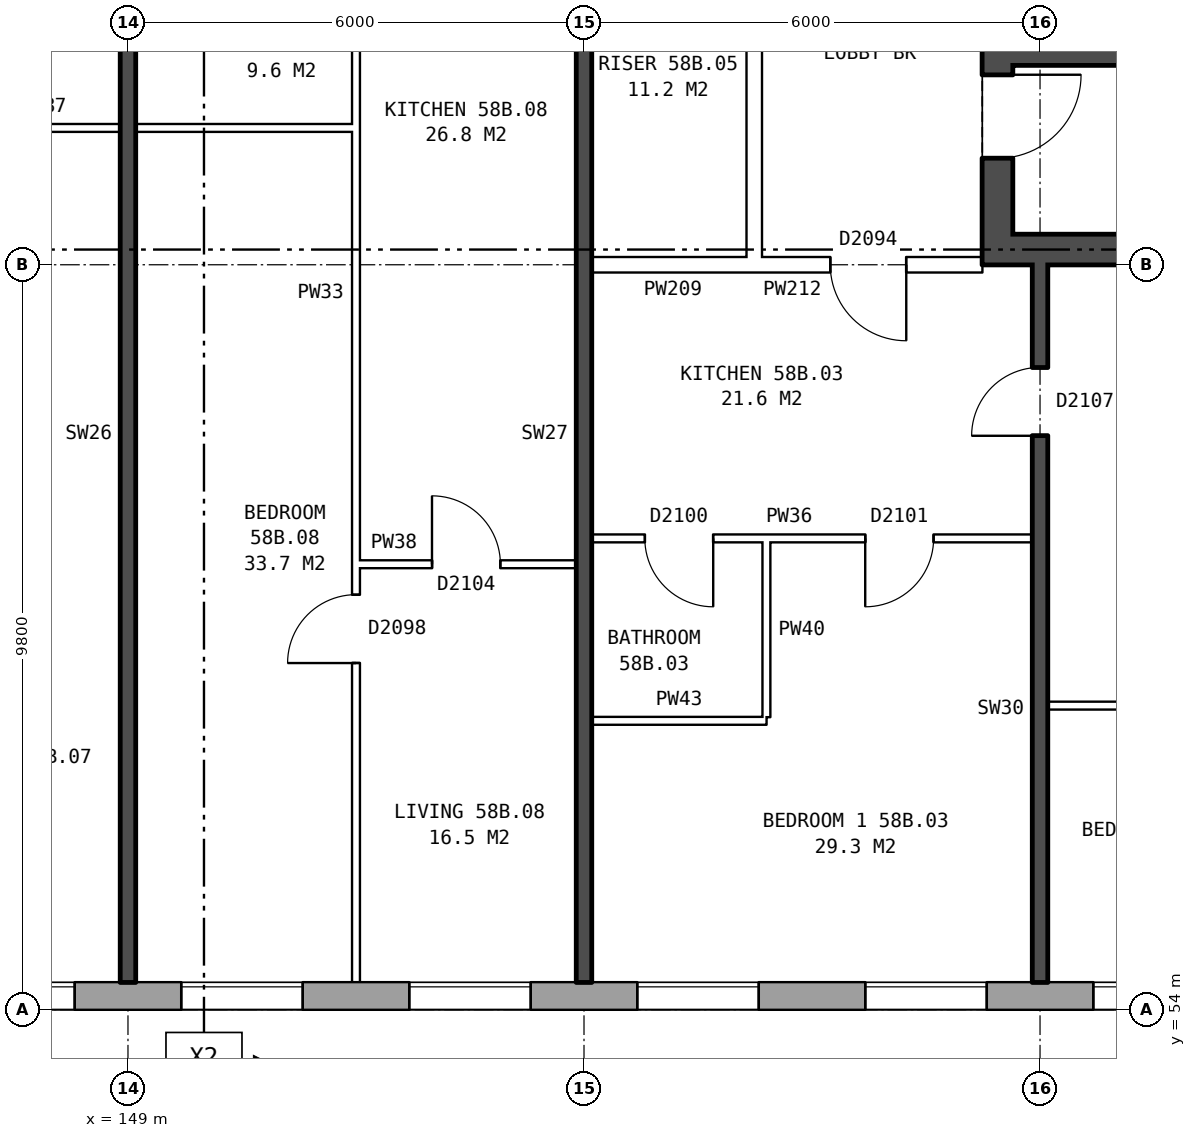
"""IFC4 building model, lengths in metres.
Left out: names, types, materials, properties, quantities, classifications, styles, units other than length and angle.
Written with IfcOpenShell. Run it as: python <this file> out.ifc"""

import sys

from ifc_helpers import new_model, si_unit, direction, frame, frame_2d, origin, place, context, subcontext, project, spatial, rectangle, extrude, element, fill, save


model = new_model("IFC4")
c1 = context("Model", 3, precision=1e-05, world=origin(), true_north=direction((0.0, 1.0)))
c2 = subcontext(c1, "Body", "Model", "MODEL_VIEW")
j1 = project(units=[si_unit("LENGTHUNIT", "METRE"), si_unit("PLANEANGLEUNIT", "RADIAN")], contexts=[c1])
p1 = place(None, origin())
s1 = spatial("IfcSite", under=j1, at=p1, CompositionType="ELEMENT")
p2 = place(p1, origin())
s2 = spatial("IfcBuilding", under=s1, at=p2, CompositionType="ELEMENT")
p3 = place(p2, frame((0.0, 0.0, 205.9)))
s3 = spatial("IfcBuildingStorey", under=s2, at=p3, CompositionType="ELEMENT", Elevation=205.9)
p4 = place(p3, frame((132.05, 54.18, 0.0), z_axis=(0.0, 0.0, 1.0), x_axis=(1.0, 0.0, 0.0)))
e1 = element("IfcWall", 1, at=p4, inside=s3, PredefinedType="STANDARD", context=c2, shape_type="SweptSolid", body=[
    extrude(rectangle(XDim=33.875, YDim=0.36, at=frame_2d((16.938, 0.0))), origin(), (0.0, 0.0, 1.0), 2.85),
])
p5 = place(p4, frame((0.3, 0.0, 0.9)))
e2 = element("IfcOpeningElement", 2, at=p5, cuts=e1, PredefinedType="OPENING", context=c2, shape_type="SweptSolid", body=[
    extrude(rectangle(XDim=0.8, YDim=1.5, at=frame_2d((0.4, 0.75))), frame((0.0, 0.19, 0.0), z_axis=(0.0, -1.0, 0.0), x_axis=(1.0, 0.0, 0.0)), (0.0, 0.0, 1.0), 0.38),
])
p6 = place(p4, frame((5.65, 0.0, 0.8)))
e3 = element("IfcOpeningElement", 3, at=p6, cuts=e1, PredefinedType="OPENING", context=c2, shape_type="SweptSolid", body=[
    extrude(rectangle(XDim=1.6, YDim=1.8, at=frame_2d((0.8, 0.9))), frame((0.0, 0.19, 0.0), z_axis=(0.0, -1.0, 0.0), x_axis=(1.0, 0.0, 0.0)), (0.0, 0.0, 1.0), 0.38),
])
p7 = place(p4, frame((8.65, 0.0, 0.8)))
e4 = element("IfcOpeningElement", 4, at=p7, cuts=e1, PredefinedType="OPENING", context=c2, shape_type="SweptSolid", body=[
    extrude(rectangle(XDim=1.6, YDim=1.8, at=frame_2d((0.8, 0.9))), frame((0.0, 0.19, 0.0), z_axis=(0.0, -1.0, 0.0), x_axis=(1.0, 0.0, 0.0)), (0.0, 0.0, 1.0), 0.38),
])
p8 = place(p4, frame((11.65, 0.0, 0.8)))
e5 = element("IfcOpeningElement", 5, at=p8, cuts=e1, PredefinedType="OPENING", context=c2, shape_type="SweptSolid", body=[
    extrude(rectangle(XDim=1.6, YDim=1.8, at=frame_2d((0.8, 0.9))), frame((0.0, 0.19, 0.0), z_axis=(0.0, -1.0, 0.0), x_axis=(1.0, 0.0, 0.0)), (0.0, 0.0, 1.0), 0.38),
])
p9 = place(p4, frame((14.65, 0.0, 0.8)))
e6 = element("IfcOpeningElement", 6, at=p9, cuts=e1, PredefinedType="OPENING", context=c2, shape_type="SweptSolid", body=[
    extrude(rectangle(XDim=1.6, YDim=1.8, at=frame_2d((0.8, 0.9))), frame((0.0, 0.19, 0.0), z_axis=(0.0, -1.0, 0.0), x_axis=(1.0, 0.0, 0.0)), (0.0, 0.0, 1.0), 0.38),
])
p10 = place(p4, frame((17.65, 0.0, 0.8)))
e7 = element("IfcOpeningElement", 7, at=p10, cuts=e1, PredefinedType="OPENING", context=c2, shape_type="SweptSolid", body=[
    extrude(rectangle(XDim=1.6, YDim=1.8, at=frame_2d((0.8, 0.9))), frame((0.0, 0.19, 0.0), z_axis=(0.0, -1.0, 0.0), x_axis=(1.0, 0.0, 0.0)), (0.0, 0.0, 1.0), 0.38),
])
p11 = place(p4, frame((20.65, 0.0, 0.8)))
e8 = element("IfcOpeningElement", 8, at=p11, cuts=e1, PredefinedType="OPENING", context=c2, shape_type="SweptSolid", body=[
    extrude(rectangle(XDim=1.6, YDim=1.8, at=frame_2d((0.8, 0.9))), frame((0.0, 0.19, 0.0), z_axis=(0.0, -1.0, 0.0), x_axis=(1.0, 0.0, 0.0)), (0.0, 0.0, 1.0), 0.38),
])
p12 = place(p4, frame((23.65, 0.0, 0.8)))
e9 = element("IfcOpeningElement", 9, at=p12, cuts=e1, PredefinedType="OPENING", context=c2, shape_type="SweptSolid", body=[
    extrude(rectangle(XDim=1.6, YDim=1.8, at=frame_2d((0.8, 0.9))), frame((0.0, 0.19, 0.0), z_axis=(0.0, -1.0, 0.0), x_axis=(1.0, 0.0, 0.0)), (0.0, 0.0, 1.0), 0.38),
])
p13 = place(p4, frame((26.65, 0.0, 0.8)))
e10 = element("IfcOpeningElement", 10, at=p13, cuts=e1, PredefinedType="OPENING", context=c2, shape_type="SweptSolid", body=[
    extrude(rectangle(XDim=1.6, YDim=1.8, at=frame_2d((0.8, 0.9))), frame((0.0, 0.19, 0.0), z_axis=(0.0, -1.0, 0.0), x_axis=(1.0, 0.0, 0.0)), (0.0, 0.0, 1.0), 0.38),
])
p14 = place(p4, frame((29.65, 0.0, 0.8)))
e11 = element("IfcOpeningElement", 11, at=p14, cuts=e1, PredefinedType="OPENING", context=c2, shape_type="SweptSolid", body=[
    extrude(rectangle(XDim=1.6, YDim=1.8, at=frame_2d((0.8, 0.9))), frame((0.0, 0.19, 0.0), z_axis=(0.0, -1.0, 0.0), x_axis=(1.0, 0.0, 0.0)), (0.0, 0.0, 1.0), 0.38),
])
p15 = place(p4, frame((3.2, 0.0, 0.8)))
e12 = element("IfcOpeningElement", 12, at=p15, cuts=e1, PredefinedType="OPENING", context=c2, shape_type="SweptSolid", body=[
    extrude(rectangle(XDim=1.4, YDim=1.8, at=frame_2d((0.7, 0.9))), frame((0.0, 0.19, 0.0), z_axis=(0.0, -1.0, 0.0), x_axis=(1.0, 0.0, 0.0)), (0.0, 0.0, 1.0), 0.38),
])
p16 = place(p3, frame((160.44, 76.2, 0.0), z_axis=(0.0, 0.0, 1.0), x_axis=(0.0, -1.0, 0.0)))
e13 = element("IfcWall", 13, at=p16, inside=s3, PredefinedType="SHEAR", context=c2, shape_type="SweptSolid", body=[
    extrude(rectangle(XDim=12.4, YDim=0.4, at=frame_2d((6.2, 0.0))), origin(), (0.0, 0.0, 1.0), 2.85),
])
p17 = place(p16, frame((1.325, 0.0, 0.0)))
e14 = element("IfcOpeningElement", 14, at=p17, cuts=e13, PredefinedType="OPENING", context=c2, shape_type="SweptSolid", body=[
    extrude(rectangle(XDim=1.1, YDim=2.1, at=frame_2d((0.55, 1.05))), frame((0.0, 0.21, 0.0), z_axis=(0.0, -1.0, 0.0), x_axis=(1.0, 0.0, 0.0)), (0.0, 0.0, 1.0), 0.42),
])
p18 = place(p16, frame((4.825, 0.0, 0.0)))
e15 = element("IfcOpeningElement", 15, at=p18, cuts=e13, PredefinedType="OPENING", context=c2, shape_type="SweptSolid", body=[
    extrude(rectangle(XDim=0.85, YDim=2.1, at=frame_2d((0.425, 1.05))), frame((0.0, 0.21, 0.0), z_axis=(0.0, -1.0, 0.0), x_axis=(1.0, 0.0, 0.0)), (0.0, 0.0, 1.0), 0.42),
])
p19 = place(p16, frame((9.9, 0.0, 0.0)))
e16 = element("IfcOpeningElement", 16, at=p19, cuts=e13, PredefinedType="OPENING", context=c2, shape_type="SweptSolid", body=[
    extrude(rectangle(XDim=1.1, YDim=2.1, at=frame_2d((0.55, 1.05))), frame((0.0, 0.21, 0.0), z_axis=(0.0, -1.0, 0.0), x_axis=(1.0, 0.0, 0.0)), (0.0, 0.0, 1.0), 0.42),
])
p20 = place(p16, frame((8.125, 0.0, 0.0)))
e17 = element("IfcOpeningElement", 17, at=p20, cuts=e13, PredefinedType="OPENING", context=c2, shape_type="SweptSolid", body=[
    extrude(rectangle(XDim=0.85, YDim=2.1, at=frame_2d((0.425, 1.05))), frame((0.0, 0.21, 0.0), z_axis=(0.0, -1.0, 0.0), x_axis=(1.0, 0.0, 0.0)), (0.0, 0.0, 1.0), 0.42),
])
p21 = place(p3, frame((160.64, 64.0, 0.0), z_axis=(0.0, 0.0, 1.0), x_axis=(1.0, 0.0, 0.0)))
e18 = element("IfcWall", 18, at=p21, inside=s3, PredefinedType="SHEAR", context=c2, shape_type="SweptSolid", body=[
    extrude(rectangle(XDim=7.6, YDim=0.4, at=frame_2d((3.8, 0.0))), origin(), (0.0, 0.0, 1.0), 2.85),
])
p22 = place(p3, frame((160.64, 66.55, 0.0), z_axis=(0.0, 0.0, 1.0), x_axis=(1.0, 0.0, 0.0)))
e19 = element("IfcWall", 19, at=p22, inside=s3, PredefinedType="SHEAR", context=c2, shape_type="SweptSolid", body=[
    extrude(rectangle(XDim=2.525, YDim=0.25, at=frame_2d((1.263, 0.0))), origin(), (0.0, 0.0, 1.0), 2.85),
])
p23 = place(p3, frame((157.24, 63.9, 0.0), z_axis=(0.0, 0.0, 1.0), x_axis=(0.0, 1.0, 0.0)))
e20 = element("IfcWall", 20, at=p23, inside=s3, PredefinedType="PARTITIONING", context=c2, shape_type="SweptSolid", body=[
    extrude(rectangle(XDim=12.2, YDim=0.2, at=frame_2d((6.1, 0.0))), origin(), (0.0, 0.0, 1.0), 2.85),
])
p24 = place(p23, frame((5.1, 0.0, 0.0)))
e21 = element("IfcOpeningElement", 21, at=p24, cuts=e20, PredefinedType="OPENING", context=c2, shape_type="SweptSolid", body=[
    extrude(rectangle(XDim=2.0, YDim=2.1, at=frame_2d((1.0, 1.05))), frame((0.0, 0.11, 0.0), z_axis=(0.0, -1.0, 0.0), x_axis=(1.0, 0.0, 0.0)), (0.0, 0.0, 1.0), 0.22),
])
p25 = place(p3, frame((155.1, 57.8, 0.0), z_axis=(0.0, 0.0, 1.0), x_axis=(1.0, 0.0, 0.0)))
e22 = element("IfcWall", 22, at=p25, inside=s3, PredefinedType="PARTITIONING", context=c2, shape_type="SweptSolid", body=[
    extrude(rectangle(XDim=2.3, YDim=0.1, at=frame_2d((1.15, 0.0))), origin(), (0.0, 0.0, 1.0), 2.85),
])
p26 = place(p3, frame((161.1, 58.0, 0.0), z_axis=(0.0, 0.0, 1.0), x_axis=(1.0, 0.0, 0.0)))
e23 = element("IfcWall", 23, at=p26, inside=s3, PredefinedType="PARTITIONING", context=c2, shape_type="SweptSolid", body=[
    extrude(rectangle(XDim=7.54, YDim=0.1, at=frame_2d((3.77, 0.0))), origin(), (0.0, 0.0, 1.0), 2.85),
])
p27 = place(p26, frame((3.32, 0.0, 0.0)))
e24 = element("IfcOpeningElement", 24, at=p27, cuts=e23, PredefinedType="OPENING", context=c2, shape_type="SweptSolid", body=[
    extrude(rectangle(XDim=0.9, YDim=2.1, at=frame_2d((0.45, 1.05))), frame((0.0, 0.06, 0.0), z_axis=(0.0, -1.0, 0.0), x_axis=(1.0, 0.0, 0.0)), (0.0, 0.0, 1.0), 0.12),
])
p28 = place(p3, frame((152.0, 59.86, 0.0), z_axis=(0.0, 0.0, 1.0), x_axis=(1.0, 0.0, 0.0)))
e25 = element("IfcWall", 25, at=p28, inside=s3, PredefinedType="PARTITIONING", context=c2, shape_type="SweptSolid", body=[
    extrude(rectangle(XDim=2.9, YDim=0.1, at=frame_2d((1.45, 0.0))), origin(), (0.0, 0.0, 1.0), 2.85),
])
p29 = place(p28, frame((1.0, 0.0, 0.0)))
e26 = element("IfcOpeningElement", 26, at=p29, cuts=e25, PredefinedType="OPENING", context=c2, shape_type="SweptSolid", body=[
    extrude(rectangle(XDim=0.9, YDim=2.1, at=frame_2d((0.45, 1.05))), frame((0.0, 0.06, 0.0), z_axis=(0.0, -1.0, 0.0), x_axis=(1.0, 0.0, 0.0)), (0.0, 0.0, 1.0), 0.12),
])
p30 = place(p3, frame((155.1, 60.2, 0.0), z_axis=(0.0, 0.0, 1.0), x_axis=(1.0, 0.0, 0.0)))
e27 = element("IfcWall", 27, at=p30, inside=s3, PredefinedType="PARTITIONING", context=c2, shape_type="SweptSolid", body=[
    extrude(rectangle(XDim=5.8, YDim=0.1, at=frame_2d((2.9, 0.0))), origin(), (0.0, 0.0, 1.0), 2.85),
])
p31 = place(p30, frame((3.6, 0.0, 0.0)))
e28 = element("IfcOpeningElement", 28, at=p31, cuts=e27, PredefinedType="OPENING", context=c2, shape_type="SweptSolid", body=[
    extrude(rectangle(XDim=0.9, YDim=2.1, at=frame_2d((0.45, 1.05))), frame((0.0, 0.06, 0.0), z_axis=(0.0, -1.0, 0.0), x_axis=(1.0, 0.0, 0.0)), (0.0, 0.0, 1.0), 0.12),
])
p32 = place(p30, frame((0.7, 0.0, 0.0)))
e29 = element("IfcOpeningElement", 29, at=p32, cuts=e27, PredefinedType="OPENING", context=c2, shape_type="SweptSolid", body=[
    extrude(rectangle(XDim=0.9, YDim=2.1, at=frame_2d((0.45, 1.05))), frame((0.0, 0.06, 0.0), z_axis=(0.0, -1.0, 0.0), x_axis=(1.0, 0.0, 0.0)), (0.0, 0.0, 1.0), 0.12),
])
p33 = place(p3, frame((155.1, 63.8, 0.0), z_axis=(0.0, 0.0, 1.0), x_axis=(1.0, 0.0, 0.0)))
e30 = element("IfcWall", 30, at=p33, inside=s3, PredefinedType="PARTITIONING", context=c2, shape_type="SweptSolid", body=[
    extrude(rectangle(XDim=2.14, YDim=0.2, at=frame_2d((1.07, 0.0))), origin(), (0.0, 0.0, 1.0), 2.85),
])
p34 = place(p3, frame((157.24, 63.8, 0.0), z_axis=(0.0, 0.0, 1.0), x_axis=(1.0, 0.0, 0.0)))
e31 = element("IfcWall", 31, at=p34, inside=s3, PredefinedType="PARTITIONING", context=c2, shape_type="SweptSolid", body=[
    extrude(rectangle(XDim=3.0, YDim=0.2, at=frame_2d((1.5, 0.0))), origin(), (0.0, 0.0, 1.0), 2.85),
])
p35 = place(p34, frame((1.0, 0.0, 0.0)))
e32 = element("IfcOpeningElement", 32, at=p35, cuts=e31, PredefinedType="OPENING", context=c2, shape_type="SweptSolid", body=[
    extrude(rectangle(XDim=1.0, YDim=2.1, at=frame_2d((0.5, 1.05))), frame((0.0, 0.11, 0.0), z_axis=(0.0, -1.0, 0.0), x_axis=(1.0, 0.0, 0.0)), (0.0, 0.0, 1.0), 0.22),
])
p36 = place(p3, frame((146.0, 65.6, 0.0), z_axis=(0.0, 0.0, 1.0), x_axis=(1.0, 0.0, 0.0)))
e33 = element("IfcWall", 33, at=p36, inside=s3, PredefinedType="PARTITIONING", context=c2, shape_type="SweptSolid", body=[
    extrude(rectangle(XDim=6.0, YDim=0.1, at=frame_2d((3.0, 0.0))), origin(), (0.0, 0.0, 1.0), 2.85),
])
p37 = place(p3, frame((149.0, 54.36, 0.0), z_axis=(0.0, 0.0, 1.0), x_axis=(0.0, 1.0, 0.0)))
e34 = element("IfcWall", 34, at=p37, inside=s3, PredefinedType="SOLIDWALL", context=c2, shape_type="SweptSolid", body=[
    extrude(rectangle(XDim=14.44, YDim=0.2, at=frame_2d((7.22, 0.0))), origin(), (0.0, 0.0, 1.0), 2.85),
])
p38 = place(p3, frame((152.0, 54.36, 0.0), z_axis=(0.0, 0.0, 1.0), x_axis=(0.0, 1.0, 0.0)))
e35 = element("IfcWall", 35, at=p38, inside=s3, PredefinedType="PARTITIONING", context=c2, shape_type="SweptSolid", body=[
    extrude(rectangle(XDim=14.34, YDim=0.1, at=frame_2d((7.17, 0.0))), origin(), (0.0, 0.0, 1.0), 2.85),
])
p39 = place(p38, frame((4.2, 0.0, 0.0)))
e36 = element("IfcOpeningElement", 36, at=p39, cuts=e35, PredefinedType="OPENING", context=c2, shape_type="SweptSolid", body=[
    extrude(rectangle(XDim=0.9, YDim=2.1, at=frame_2d((0.45, 1.05))), frame((0.0, 0.06, 0.0), z_axis=(0.0, -1.0, 0.0), x_axis=(1.0, 0.0, 0.0)), (0.0, 0.0, 1.0), 0.12),
])
p40 = place(p38, frame((13.04, 0.0, 0.0)))
e37 = element("IfcOpeningElement", 37, at=p40, cuts=e35, PredefinedType="OPENING", context=c2, shape_type="SweptSolid", body=[
    extrude(rectangle(XDim=0.9, YDim=2.1, at=frame_2d((0.45, 1.05))), frame((0.0, 0.06, 0.0), z_axis=(0.0, -1.0, 0.0), x_axis=(1.0, 0.0, 0.0)), (0.0, 0.0, 1.0), 0.12),
])
p41 = place(p3, frame((155.0, 54.36, 0.0), z_axis=(0.0, 0.0, 1.0), x_axis=(0.0, 1.0, 0.0)))
e38 = element("IfcWall", 38, at=p41, inside=s3, PredefinedType="SOLIDWALL", context=c2, shape_type="SweptSolid", body=[
    extrude(rectangle(XDim=14.44, YDim=0.2, at=frame_2d((7.22, 0.0))), origin(), (0.0, 0.0, 1.0), 2.85),
])
p42 = place(p3, frame((157.4, 57.85, 0.0), z_axis=(0.0, 0.0, 1.0), x_axis=(0.0, 1.0, 0.0)))
e39 = element("IfcWall", 39, at=p42, inside=s3, PredefinedType="PARTITIONING", context=c2, shape_type="SweptSolid", body=[
    extrude(rectangle(XDim=2.3, YDim=0.1, at=frame_2d((1.15, 0.0))), origin(), (0.0, 0.0, 1.0), 2.85),
])
p43 = place(p3, frame((161.0, 54.36, 0.0), z_axis=(0.0, 0.0, 1.0), x_axis=(0.0, 1.0, 0.0)))
e40 = element("IfcWall", 40, at=p43, inside=s3, PredefinedType="SOLIDWALL", context=c2, shape_type="SweptSolid", body=[
    extrude(rectangle(XDim=9.44, YDim=0.2, at=frame_2d((4.72, 0.0))), origin(), (0.0, 0.0, 1.0), 2.85),
])
p44 = place(p43, frame((7.19, 0.0, 0.0)))
e41 = element("IfcOpeningElement", 41, at=p44, cuts=e40, PredefinedType="OPENING", context=c2, shape_type="SweptSolid", body=[
    extrude(rectangle(XDim=0.9, YDim=2.1, at=frame_2d((0.45, 1.05))), frame((0.0, 0.11, 0.0), z_axis=(0.0, -1.0, 0.0), x_axis=(1.0, 0.0, 0.0)), (0.0, 0.0, 1.0), 0.22),
])
p45 = place(p9, origin())
e42 = element("IfcWindow", 42, at=p45, inside=s3, PartitioningType="SINGLE_PANEL", PredefinedType="WINDOW", context=c2, shape_type="SweptSolid", body=[
    extrude(rectangle(XDim=1.6, YDim=1.8, at=frame_2d((0.8, 0.9))), frame((0.0, 0.15, 0.0), z_axis=(0.0, -1.0, 0.0), x_axis=(1.0, 0.0, 0.0)), (0.0, 0.0, 1.0), 0.06),
])
fill(e6, e42)
p46 = place(p10, origin())
e43 = element("IfcWindow", 43, at=p46, inside=s3, PartitioningType="SINGLE_PANEL", PredefinedType="WINDOW", context=c2, shape_type="SweptSolid", body=[
    extrude(rectangle(XDim=1.6, YDim=1.8, at=frame_2d((0.8, 0.9))), frame((0.0, 0.15, 0.0), z_axis=(0.0, -1.0, 0.0), x_axis=(1.0, 0.0, 0.0)), (0.0, 0.0, 1.0), 0.06),
])
fill(e7, e43)
p47 = place(p11, origin())
e44 = element("IfcWindow", 44, at=p47, inside=s3, PartitioningType="SINGLE_PANEL", PredefinedType="WINDOW", context=c2, shape_type="SweptSolid", body=[
    extrude(rectangle(XDim=1.6, YDim=1.8, at=frame_2d((0.8, 0.9))), frame((0.0, 0.15, 0.0), z_axis=(0.0, -1.0, 0.0), x_axis=(1.0, 0.0, 0.0)), (0.0, 0.0, 1.0), 0.06),
])
fill(e8, e44)
p48 = place(p12, origin())
e45 = element("IfcWindow", 45, at=p48, inside=s3, PartitioningType="SINGLE_PANEL", PredefinedType="WINDOW", context=c2, shape_type="SweptSolid", body=[
    extrude(rectangle(XDim=1.6, YDim=1.8, at=frame_2d((0.8, 0.9))), frame((0.0, 0.15, 0.0), z_axis=(0.0, -1.0, 0.0), x_axis=(1.0, 0.0, 0.0)), (0.0, 0.0, 1.0), 0.06),
])
fill(e9, e45)
p49 = place(p13, origin())
e46 = element("IfcWindow", 46, at=p49, inside=s3, PartitioningType="SINGLE_PANEL", PredefinedType="WINDOW", context=c2, shape_type="SweptSolid", body=[
    extrude(rectangle(XDim=1.6, YDim=1.8, at=frame_2d((0.8, 0.9))), frame((0.0, 0.15, 0.0), z_axis=(0.0, -1.0, 0.0), x_axis=(1.0, 0.0, 0.0)), (0.0, 0.0, 1.0), 0.06),
])
fill(e10, e46)
p50 = place(p14, origin())
e47 = element("IfcWindow", 47, at=p50, inside=s3, PartitioningType="SINGLE_PANEL", PredefinedType="WINDOW", context=c2, shape_type="SweptSolid", body=[
    extrude(rectangle(XDim=1.6, YDim=1.8, at=frame_2d((0.8, 0.9))), frame((0.0, 0.15, 0.0), z_axis=(0.0, -1.0, 0.0), x_axis=(1.0, 0.0, 0.0)), (0.0, 0.0, 1.0), 0.06),
])
fill(e11, e47)
p51 = place(p19, origin())
e48 = element("IfcDoor", 48, at=p51, inside=s3, OperationType="SINGLE_SWING_LEFT", PredefinedType="DOOR", context=c2, shape_type="SweptSolid", body=[
    extrude(rectangle(XDim=1.1, YDim=2.1, at=frame_2d((0.55, 1.05))), frame((0.0, 0.185, 0.0), z_axis=(0.0, -1.0, 0.0), x_axis=(1.0, 0.0, 0.0)), (0.0, 0.0, 1.0), 0.05),
])
fill(e16, e48)
p52 = place(p31, frame((0.9, 0.0, 0.0), z_axis=(0.0, 0.0, 1.0), x_axis=(-1.0, 0.0, 0.0)))
e49 = element("IfcDoor", 49, at=p52, inside=s3, OperationType="SINGLE_SWING_RIGHT", PredefinedType="DOOR", context=c2, shape_type="SweptSolid", body=[
    extrude(rectangle(XDim=0.9, YDim=2.1, at=frame_2d((0.45, 1.05))), frame((0.0, 0.025, 0.0), z_axis=(0.0, -1.0, 0.0), x_axis=(1.0, 0.0, 0.0)), (0.0, 0.0, 1.0), 0.05),
])
fill(e28, e49)
p53 = place(p35, frame((1.0, 0.0, 0.0), z_axis=(0.0, 0.0, 1.0), x_axis=(-1.0, 0.0, 0.0)))
e50 = element("IfcDoor", 50, at=p53, inside=s3, OperationType="SINGLE_SWING_LEFT", PredefinedType="DOOR", context=c2, shape_type="SweptSolid", body=[
    extrude(rectangle(XDim=1.0, YDim=2.1, at=frame_2d((0.5, 1.05))), frame((0.0, 0.025, 0.0), z_axis=(0.0, -1.0, 0.0), x_axis=(1.0, 0.0, 0.0)), (0.0, 0.0, 1.0), 0.05),
])
fill(e32, e50)
p54 = place(p44, origin())
e51 = element("IfcDoor", 51, at=p54, inside=s3, OperationType="SINGLE_SWING_LEFT", PredefinedType="DOOR", context=c2, shape_type="SweptSolid", body=[
    extrude(rectangle(XDim=0.9, YDim=2.1, at=frame_2d((0.45, 1.05))), frame((0.0, 0.025, 0.0), z_axis=(0.0, -1.0, 0.0), x_axis=(1.0, 0.0, 0.0)), (0.0, 0.0, 1.0), 0.05),
])
fill(e41, e51)
p55 = place(p32, frame((0.9, 0.0, 0.0), z_axis=(0.0, 0.0, 1.0), x_axis=(-1.0, 0.0, 0.0)))
e52 = element("IfcDoor", 52, at=p55, inside=s3, OperationType="SINGLE_SWING_LEFT", PredefinedType="DOOR", context=c2, shape_type="SweptSolid", body=[
    extrude(rectangle(XDim=0.9, YDim=2.1, at=frame_2d((0.45, 1.05))), frame((0.0, 0.025, 0.0), z_axis=(0.0, -1.0, 0.0), x_axis=(1.0, 0.0, 0.0)), (0.0, 0.0, 1.0), 0.05),
])
fill(e29, e52)
p56 = place(p39, origin())
e53 = element("IfcDoor", 53, at=p56, inside=s3, OperationType="SINGLE_SWING_LEFT", PredefinedType="DOOR", context=c2, shape_type="SweptSolid", body=[
    extrude(rectangle(XDim=0.9, YDim=2.1, at=frame_2d((0.45, 1.05))), frame((0.0, 0.025, 0.0), z_axis=(0.0, -1.0, 0.0), x_axis=(1.0, 0.0, 0.0)), (0.0, 0.0, 1.0), 0.05),
])
fill(e36, e53)
p57 = place(p29, origin())
e54 = element("IfcDoor", 54, at=p57, inside=s3, OperationType="SINGLE_SWING_LEFT", PredefinedType="DOOR", context=c2, shape_type="SweptSolid", body=[
    extrude(rectangle(XDim=0.9, YDim=2.1, at=frame_2d((0.45, 1.05))), frame((0.0, 0.025, 0.0), z_axis=(0.0, -1.0, 0.0), x_axis=(1.0, 0.0, 0.0)), (0.0, 0.0, 1.0), 0.05),
])
fill(e26, e54)
save(model, sys.argv[1])
